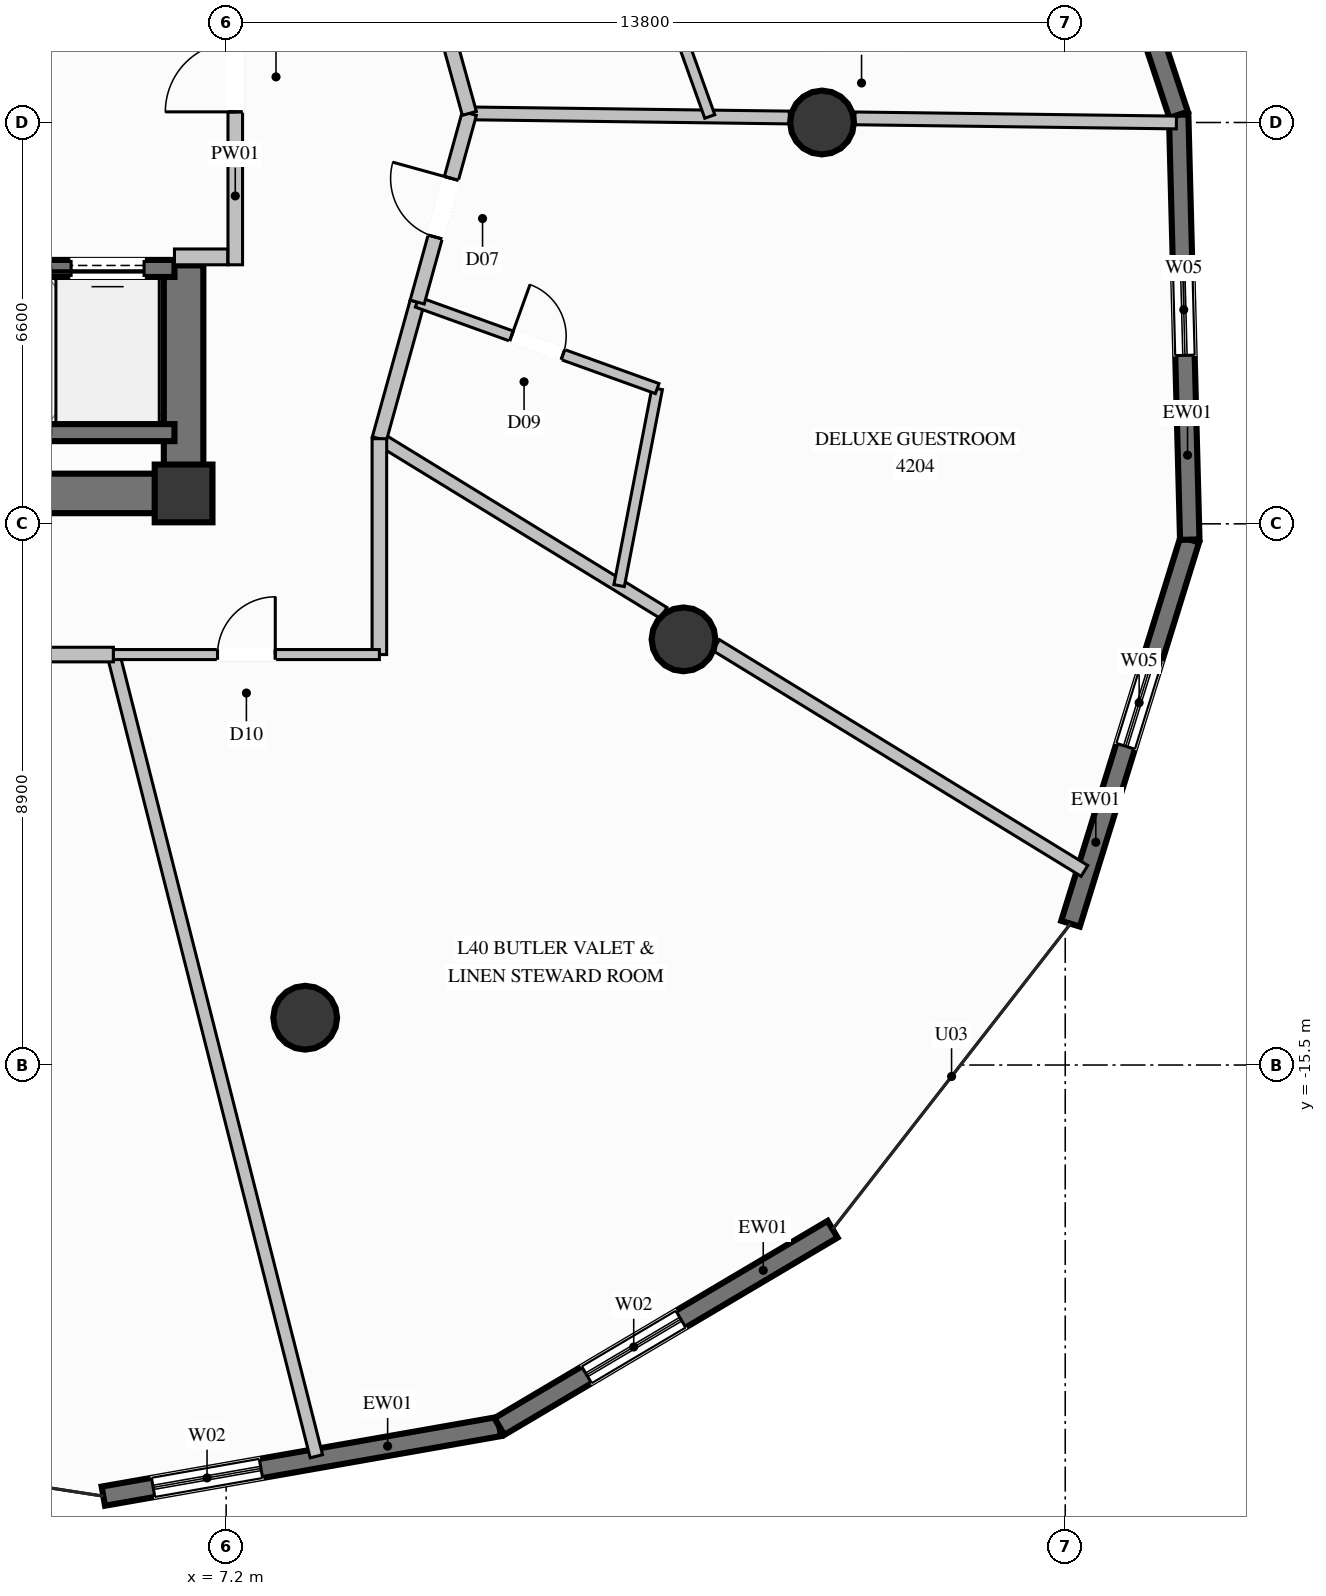
"""IFC4 building model, lengths in metres.
Left out: names, types, materials, properties, quantities, classifications, styles, units other than length and angle.
Written with IfcOpenShell. Run it as: python <this file> out.ifc"""

import sys

from ifc_helpers import new_model, si_unit, direction, frame, frame_2d, origin, origin_2d, place, context, subcontext, project, spatial, rectangle, circle, extrude, element, fill, save


model = new_model("IFC4")
c1 = context("Model", 3, precision=1e-05, world=origin(), true_north=direction((0.0, 1.0)))
c2 = subcontext(c1, "Body", "Model", "MODEL_VIEW")
j1 = project(units=[si_unit("LENGTHUNIT", "METRE"), si_unit("PLANEANGLEUNIT", "RADIAN")], contexts=[c1])
p1 = place(None, origin())
s1 = spatial("IfcSite", under=j1, at=p1, CompositionType="ELEMENT")
p2 = place(p1, origin())
s2 = spatial("IfcBuilding", under=s1, at=p2, CompositionType="ELEMENT")
p3 = place(p2, frame((0.0, 0.0, 156.6)))
s3 = spatial("IfcBuildingStorey", under=s2, at=p3, CompositionType="ELEMENT", Elevation=156.6)
p4 = place(p3, frame((6.5, -6.1, 0.0), z_axis=(0.0, 0.0, 1.0), x_axis=(1.0, 0.0, 0.0)))
e1 = element("IfcColumn", 1, at=p4, inside=s3, PredefinedType="COLUMN", context=c2, shape_type="SweptSolid", body=[
    extrude(rectangle(XDim=0.95, YDim=0.95, at=origin_2d()), origin(), (0.0, 0.0, 1.0), 3.6),
])
p5 = place(p3, frame((4.15, -6.1, 0.0), z_axis=(0.0, 0.0, 1.0), x_axis=(1.0, 0.0, 0.0)))
e2 = element("IfcWall", 2, at=p5, inside=s3, PredefinedType="SHEAR", context=c2, shape_type="SweptSolid", body=[
    extrude(rectangle(XDim=2.025, YDim=0.65, at=frame_2d((1.013, 0.0))), origin(), (0.0, 0.0, 1.0), 3.6),
])
p6 = place(p3, frame((6.5, -6.425, 0.0), z_axis=(0.0, 0.0, 1.0), x_axis=(0.0, 1.0, 0.0)))
e3 = element("IfcWall", 3, at=p6, inside=s3, PredefinedType="SHEAR", context=c2, shape_type="SweptSolid", body=[
    extrude(rectangle(XDim=4.075, YDim=0.65, at=frame_2d((2.038, 0.0))), origin(), (0.0, 0.0, 1.0), 3.6),
])
for number, where, z_axis, x_axis in (
    (4, (17.0, 0.0, 0.0), (0.0, 0.0, 1.0), (1.0, 0.0, 0.0)),
    (5, (8.5, -14.722, 0.0), (0.0, 0.0, 1.0), (1.0, 0.0, 0.0)),
    (6, (14.722, -8.5, 0.0), (0.0, 0.0, 1.0), (1.0, 0.0, 0.0)),
):
    element("IfcColumn", number, at=place(p3, frame(where, z_axis=z_axis, x_axis=x_axis)), inside=s3, PredefinedType="COLUMN", context=c2, shape_type="SweptSolid", body=[
        extrude(circle(Radius=0.525, at=origin_2d()), origin(), (0.0, 0.0, 1.0), 3.6),
    ])
p7 = place(p3, frame((23.048, -6.86, 0.0), z_axis=(0.0, 0.0, 1.0), x_axis=(-0.296546675367, -0.955018360729, 0.0)))
e7 = element("IfcWall", 7, at=p7, inside=s3, PredefinedType="SOLIDWALL", context=c2, shape_type="SweptSolid", body=[
    extrude(rectangle(XDim=6.613, YDim=0.32, at=frame_2d((3.307, 0.0))), origin(), (0.0, 0.0, 1.0), 3.35),
])
p8 = place(p7, frame((2.058, 0.0, 0.85)))
e8 = element("IfcOpeningElement", 8, at=p8, cuts=e7, PredefinedType="OPENING", context=c2, shape_type="SweptSolid", body=[
    extrude(rectangle(XDim=1.5, YDim=1.2, at=frame_2d((0.75, 0.6))), frame((0.0, 0.17, 0.0), z_axis=(0.0, -1.0, 0.0), x_axis=(1.0, 0.0, 0.0)), (0.0, 0.0, 1.0), 0.34),
])
p9 = place(p3, frame((22.865, 0.127, 0.0), z_axis=(0.0, 0.0, 1.0), x_axis=(0.026197372112, -0.999656789951, 0.0)))
e9 = element("IfcWall", 9, at=p9, inside=s3, PredefinedType="SOLIDWALL", context=c2, shape_type="SweptSolid", body=[
    extrude(rectangle(XDim=6.99, YDim=0.32, at=frame_2d((3.495, 0.0))), origin(), (0.0, 0.0, 1.0), 3.35),
])
p10 = place(p9, frame((2.458, 0.0, 0.85)))
e10 = element("IfcOpeningElement", 10, at=p10, cuts=e9, PredefinedType="OPENING", context=c2, shape_type="SweptSolid", body=[
    extrude(rectangle(XDim=1.5, YDim=1.2, at=frame_2d((0.75, 0.6))), frame((0.0, 0.17, 0.0), z_axis=(0.0, -1.0, 0.0), x_axis=(1.0, 0.0, 0.0)), (0.0, 0.0, 1.0), 0.34),
])
p11 = place(p3, frame((20.557, 7.102, 0.0), z_axis=(0.0, 0.0, 1.0), x_axis=(0.314153478082, -0.94937220952, 0.0)))
e11 = element("IfcWall", 11, at=p11, inside=s3, PredefinedType="SOLIDWALL", context=c2, shape_type="SweptSolid", body=[
    extrude(rectangle(XDim=7.347, YDim=0.32, at=frame_2d((3.674, 0.0))), origin(), (0.0, 0.0, 1.0), 3.35),
])
p12 = place(p11, frame((2.923, 0.0, 0.85)))
e12 = element("IfcOpeningElement", 12, at=p12, cuts=e11, PredefinedType="OPENING", context=c2, shape_type="SweptSolid", body=[
    extrude(rectangle(XDim=1.5, YDim=1.2, at=frame_2d((0.75, 0.6))), frame((0.0, 0.17, 0.0), z_axis=(0.0, -1.0, 0.0), x_axis=(1.0, 0.0, 0.0)), (0.0, 0.0, 1.0), 0.34),
])
p13 = place(p3, frame((11.693, -21.445, 0.0), z_axis=(0.0, 0.0, 1.0), x_axis=(-0.984896334406, -0.173145056165, 0.0)))
e13 = element("IfcWall", 13, at=p13, inside=s3, PredefinedType="SOLIDWALL", context=c2, shape_type="SweptSolid", body=[
    extrude(rectangle(XDim=6.613, YDim=0.32, at=frame_2d((3.307, 0.0))), origin(), (0.0, 0.0, 1.0), 3.35),
])
p14 = place(p13, frame((3.981, 0.0, 0.35)))
e14 = element("IfcOpeningElement", 14, at=p14, cuts=e13, PredefinedType="OPENING", context=c2, shape_type="SweptSolid", body=[
    extrude(rectangle(XDim=1.8, YDim=2.6, at=frame_2d((0.9, 1.3))), frame((0.0, 0.17, 0.0), z_axis=(0.0, -1.0, 0.0), x_axis=(1.0, 0.0, 0.0)), (0.0, 0.0, 1.0), 0.34),
])
p15 = place(p3, frame((17.174, -18.201, 0.0), z_axis=(0.0, 0.0, 1.0), x_axis=(-0.860555423253, -0.50935681355, 0.0)))
e15 = element("IfcWall", 15, at=p15, inside=s3, PredefinedType="SOLIDWALL", context=c2, shape_type="SweptSolid", body=[
    extrude(rectangle(XDim=6.369, YDim=0.32, at=frame_2d((3.185, 0.0))), origin(), (0.0, 0.0, 1.0), 3.35),
])
p16 = place(p15, frame((2.901, 0.0, 0.35)))
e16 = element("IfcOpeningElement", 16, at=p16, cuts=e15, PredefinedType="OPENING", context=c2, shape_type="SweptSolid", body=[
    extrude(rectangle(XDim=1.8, YDim=2.6, at=frame_2d((0.9, 1.3))), frame((0.0, 0.17, 0.0), z_axis=(0.0, -1.0, 0.0), x_axis=(1.0, 0.0, 0.0)), (0.0, 0.0, 1.0), 0.34),
])
p17 = place(p3, frame((4.15, -5.1, 0.0), z_axis=(0.0, 0.0, 1.0), x_axis=(1.0, 0.0, 0.0)))
e17 = element("IfcWall", 17, at=p17, inside=s3, PredefinedType="SOLIDWALL", context=c2, shape_type="SweptSolid", body=[
    extrude(rectangle(XDim=2.2, YDim=0.28, at=frame_2d((1.1, 0.0))), origin(), (0.0, 0.0, 1.0), 3.35),
])
p18 = place(p3, frame((6.35, -2.4, 0.0), z_axis=(0.0, 0.0, 1.0), x_axis=(-1.0, 0.0, 0.0)))
e18 = element("IfcWall", 18, at=p18, inside=s3, PredefinedType="SOLIDWALL", context=c2, shape_type="SweptSolid", body=[
    extrude(rectangle(XDim=2.2, YDim=0.28, at=frame_2d((1.1, 0.0))), origin(), (0.0, 0.0, 1.0), 3.35),
])
p19 = place(p18, frame((0.5, 0.0, 0.0)))
e19 = element("IfcOpeningElement", 19, at=p19, cuts=e18, PredefinedType="OPENING", context=c2, shape_type="SweptSolid", body=[
    extrude(rectangle(XDim=1.2, YDim=2.2, at=frame_2d((0.6, 1.1))), frame((0.0, 0.15, 0.0), z_axis=(0.0, -1.0, 0.0), x_axis=(1.0, 0.0, 0.0)), (0.0, 0.0, 1.0), 0.3),
])
p20 = place(p3, frame((7.35, -2.34, 0.0), z_axis=(0.0, 0.0, 1.0), x_axis=(0.0, 1.0, 0.0)))
e20 = element("IfcWall", 20, at=p20, inside=s3, PredefinedType="PARTITIONING", context=c2, shape_type="SweptSolid", body=[
    extrude(rectangle(XDim=5.02, YDim=0.24, at=frame_2d((2.51, 0.0))), origin(), (0.0, 0.0, 1.0), 2.435),
])
p21 = place(p20, frame((2.515, 0.0, 0.0)))
e21 = element("IfcOpeningElement", 21, at=p21, cuts=e20, PredefinedType="OPENING", context=c2, shape_type="SweptSolid", body=[
    extrude(rectangle(XDim=1.15, YDim=2.2, at=frame_2d((0.575, 1.1))), frame((0.0, 0.13, 0.0), z_axis=(0.0, -1.0, 0.0), x_axis=(1.0, 0.0, 0.0)), (0.0, 0.0, 1.0), 0.26),
])
p22 = place(p3, frame((6.35, -2.21, 0.0), z_axis=(0.0, 0.0, 1.0), x_axis=(1.0, 0.0, 0.0)))
e22 = element("IfcWall", 22, at=p22, inside=s3, PredefinedType="PARTITIONING", context=c2, shape_type="SweptSolid", body=[
    extrude(rectangle(XDim=0.875, YDim=0.26, at=frame_2d((0.438, 0.0))), origin(), (0.0, 0.0, 1.0), 3.35),
])
p23 = place(p3, frame((11.2, 0.15, 0.0), z_axis=(0.0, 0.0, 1.0), x_axis=(0.99991679467, -0.012899757247, 0.0)))
e23 = element("IfcWall", 23, at=p23, inside=s3, PredefinedType="PARTITIONING", context=c2, shape_type="SweptSolid", body=[
    extrude(rectangle(XDim=5.261, YDim=0.21, at=frame_2d((2.631, 0.0))), origin(), (0.0, 0.0, 1.0), 3.35),
])
p24 = place(p3, frame((17.541, 0.068, 0.0), z_axis=(0.0, 0.0, 1.0), x_axis=(0.9999170134, -0.012882791353, 0.0)))
e24 = element("IfcWall", 24, at=p24, inside=s3, PredefinedType="PARTITIONING", context=c2, shape_type="SweptSolid", body=[
    extrude(rectangle(XDim=5.287, YDim=0.21, at=frame_2d((2.644, 0.0))), origin(), (0.0, 0.0, 1.0), 3.35),
])
p25 = place(p3, frame((9.72, -5.2, 0.0), z_axis=(0.0, 0.0, 1.0), x_axis=(0.852582050819, -0.52259338555, 0.0)))
e25 = element("IfcWall", 25, at=p25, inside=s3, PredefinedType="PARTITIONING", context=c2, shape_type="SweptSolid", body=[
    extrude(rectangle(XDim=5.482, YDim=0.21, at=frame_2d((2.741, 0.0))), origin(), (0.0, 0.0, 1.0), 2.717),
])
p26 = place(p3, frame((15.259, -8.595, 0.0), z_axis=(0.0, 0.0, 1.0), x_axis=(0.852624466561, -0.522524180322, 0.0)))
e26 = element("IfcWall", 26, at=p26, inside=s3, PredefinedType="PARTITIONING", context=c2, shape_type="SweptSolid", body=[
    extrude(rectangle(XDim=7.104, YDim=0.21, at=frame_2d((3.552, 0.0))), origin(), (0.0, 0.0, 1.0), 3.35),
])
p27 = place(p3, frame((9.72, -5.2, 0.0), z_axis=(0.0, 0.0, 1.0), x_axis=(0.266801280383, 0.963751563831, 0.0)))
e27 = element("IfcWall", 27, at=p27, inside=s3, PredefinedType="PARTITIONING", context=c2, shape_type="SweptSolid", body=[
    extrude(rectangle(XDim=2.332, YDim=0.24, at=frame_2d((1.166, 0.0))), origin(), (0.0, 0.0, 1.0), 3.35),
])
p28 = place(p3, frame((13.663, -7.616, 0.0), z_axis=(0.0, 0.0, 1.0), x_axis=(0.189695238056, 0.981843020375, 0.0)))
e28 = element("IfcWall", 28, at=p28, inside=s3, PredefinedType="PLUMBINGWALL", context=c2, shape_type="SweptSolid", body=[
    extrude(rectangle(XDim=3.3, YDim=0.175, at=frame_2d((1.65, 0.0))), origin(), (0.0, 0.0, 1.0), 3.35),
])
p29 = place(p3, frame((10.342, -2.953, 0.0), z_axis=(0.0, 0.0, 1.0), x_axis=(0.940722627473, -0.33917685381, 0.0)))
e29 = element("IfcWall", 29, at=p29, inside=s3, PredefinedType="PLUMBINGWALL", context=c2, shape_type="SweptSolid", body=[
    extrude(rectangle(XDim=4.196, YDim=0.175, at=frame_2d((2.098, 0.0))), origin(), (0.0, 0.0, 1.0), 3.35),
])
p30 = place(p29, frame((1.648, 0.0, 0.0)))
e30 = element("IfcOpeningElement", 30, at=p30, cuts=e29, PredefinedType="OPENING", context=c2, shape_type="SweptSolid", body=[
    extrude(rectangle(XDim=0.9, YDim=2.1, at=frame_2d((0.45, 1.05))), frame((0.0, 0.098, 0.0), z_axis=(0.0, -1.0, 0.0), x_axis=(1.0, 0.0, 0.0)), (0.0, 0.0, 1.0), 0.195),
])
p31 = place(p3, frame((10.342, -2.953, 0.0), z_axis=(0.0, 0.0, 1.0), x_axis=(0.266497617314, 0.963835577246, 0.0)))
e31 = element("IfcWall", 31, at=p31, inside=s3, PredefinedType="PARTITIONING", context=c2, shape_type="SweptSolid", body=[
    extrude(rectangle(XDim=3.219, YDim=0.24, at=frame_2d((1.61, 0.0))), origin(), (0.0, 0.0, 1.0), 3.35),
])
p32 = place(p31, frame((1.11, 0.0, 0.0)))
e32 = element("IfcOpeningElement", 32, at=p32, cuts=e31, PredefinedType="OPENING", context=c2, shape_type="SweptSolid", body=[
    extrude(rectangle(XDim=1.0, YDim=2.2, at=frame_2d((0.5, 1.1))), frame((0.0, 0.13, 0.0), z_axis=(0.0, -1.0, 0.0), x_axis=(1.0, 0.0, 0.0)), (0.0, 0.0, 1.0), 0.26),
])
p33 = place(p3, frame((11.2, 0.15, 0.0), z_axis=(0.0, 0.0, 1.0), x_axis=(-0.266801280383, 0.963751563831, 0.0)))
e33 = element("IfcWall", 33, at=p33, inside=s3, PredefinedType="PARTITIONING", context=c2, shape_type="SweptSolid", body=[
    extrude(rectangle(XDim=2.332, YDim=0.24, at=frame_2d((1.166, 0.0))), origin(), (0.0, 0.0, 1.0), 3.35),
])
p34 = place(p3, frame((15.154, 0.099, 0.0), z_axis=(0.0, 0.0, 1.0), x_axis=(-0.337194784979, 0.94143490321, 0.0)))
e34 = element("IfcWall", 34, at=p34, inside=s3, PredefinedType="PLUMBINGWALL", context=c2, shape_type="SweptSolid", body=[
    extrude(rectangle(XDim=3.171, YDim=0.175, at=frame_2d((1.585, 0.0))), origin(), (0.0, 0.0, 1.0), 3.35),
])
p35 = place(p3, frame((5.346, -8.75, 0.0), z_axis=(0.0, 0.0, 1.0), x_axis=(0.245448987191, -0.969409508251, 0.0)))
e35 = element("IfcWall", 35, at=p35, inside=s3, PredefinedType="PARTITIONING", context=c2, shape_type="SweptSolid", body=[
    extrude(rectangle(XDim=13.6, YDim=0.21, at=frame_2d((6.8, 0.0))), origin(), (0.0, 0.0, 1.0), 3.35),
])
p36 = place(p3, frame((0.0, -8.75, 0.0), z_axis=(0.0, 0.0, 1.0), x_axis=(1.0, 0.0, 0.0)))
e36 = element("IfcWall", 36, at=p36, inside=s3, PredefinedType="PARTITIONING", context=c2, shape_type="SweptSolid", body=[
    extrude(rectangle(XDim=5.346, YDim=0.24, at=frame_2d((2.673, 0.0))), origin(), (0.0, 0.0, 1.0), 3.35),
])
p37 = place(p36, frame((2.173, 0.0, 0.0)))
e37 = element("IfcOpeningElement", 37, at=p37, cuts=e36, PredefinedType="OPENING", context=c2, shape_type="SweptSolid", body=[
    extrude(rectangle(XDim=1.0, YDim=2.2, at=frame_2d((0.5, 1.1))), frame((0.0, 0.13, 0.0), z_axis=(0.0, -1.0, 0.0), x_axis=(1.0, 0.0, 0.0)), (0.0, 0.0, 1.0), 0.26),
])
p38 = place(p3, frame((9.72, -8.75, 0.0), z_axis=(0.0, 0.0, 1.0), x_axis=(0.0, 1.0, 0.0)))
e38 = element("IfcWall", 38, at=p38, inside=s3, PredefinedType="PARTITIONING", context=c2, shape_type="SweptSolid", body=[
    extrude(rectangle(XDim=3.55, YDim=0.24, at=frame_2d((1.775, 0.0))), origin(), (0.0, 0.0, 1.0), 3.35),
])
p39 = place(p3, frame((5.346, -8.75, 0.0), z_axis=(0.0, 0.0, 1.0), x_axis=(1.0, 0.0, 0.0)))
e39 = element("IfcWall", 39, at=p39, inside=s3, PredefinedType="PARTITIONING", context=c2, shape_type="SweptSolid", body=[
    extrude(rectangle(XDim=4.374, YDim=0.165, at=frame_2d((2.187, 0.0))), origin(), (0.0, 0.0, 1.0), 3.35),
])
p40 = place(p39, frame((1.712, 0.0, 0.0)))
e40 = element("IfcOpeningElement", 40, at=p40, cuts=e39, PredefinedType="OPENING", context=c2, shape_type="SweptSolid", body=[
    extrude(rectangle(XDim=0.95, YDim=2.1, at=frame_2d((0.475, 1.05))), frame((0.0, 0.093, 0.0), z_axis=(0.0, -1.0, 0.0), x_axis=(1.0, 0.0, 0.0)), (0.0, 0.0, 1.0), 0.185),
])
p41 = place(p8, origin())
e41 = element("IfcWindow", 41, at=p41, inside=s3, PartitioningType="SINGLE_PANEL", PredefinedType="WINDOW", context=c2, shape_type="SweptSolid", body=[
    extrude(rectangle(XDim=1.5, YDim=1.2, at=frame_2d((0.75, 0.6))), frame((0.0, 0.03, 0.0), z_axis=(0.0, -1.0, 0.0), x_axis=(1.0, 0.0, 0.0)), (0.0, 0.0, 1.0), 0.06),
])
fill(e8, e41)
p42 = place(p10, origin())
e42 = element("IfcWindow", 42, at=p42, inside=s3, PartitioningType="SINGLE_PANEL", PredefinedType="WINDOW", context=c2, shape_type="SweptSolid", body=[
    extrude(rectangle(XDim=1.5, YDim=1.2, at=frame_2d((0.75, 0.6))), frame((0.0, 0.03, 0.0), z_axis=(0.0, -1.0, 0.0), x_axis=(1.0, 0.0, 0.0)), (0.0, 0.0, 1.0), 0.06),
])
fill(e10, e42)
p43 = place(p14, origin())
e43 = element("IfcWindow", 43, at=p43, inside=s3, PartitioningType="SINGLE_PANEL", PredefinedType="WINDOW", context=c2, shape_type="SweptSolid", body=[
    extrude(rectangle(XDim=1.8, YDim=2.6, at=frame_2d((0.9, 1.3))), frame((0.0, 0.03, 0.0), z_axis=(0.0, -1.0, 0.0), x_axis=(1.0, 0.0, 0.0)), (0.0, 0.0, 1.0), 0.06),
])
fill(e14, e43)
p44 = place(p16, origin())
e44 = element("IfcWindow", 44, at=p44, inside=s3, PartitioningType="SINGLE_PANEL", PredefinedType="WINDOW", context=c2, shape_type="SweptSolid", body=[
    extrude(rectangle(XDim=1.8, YDim=2.6, at=frame_2d((0.9, 1.3))), frame((0.0, 0.03, 0.0), z_axis=(0.0, -1.0, 0.0), x_axis=(1.0, 0.0, 0.0)), (0.0, 0.0, 1.0), 0.06),
])
fill(e16, e44)
p45 = place(p19, origin())
e45 = element("IfcDoor", 45, at=p45, inside=s3, OperationType="SLIDING_TO_LEFT", PredefinedType="DOOR", context=c2, shape_type="SweptSolid", body=[
    extrude(rectangle(XDim=1.2, YDim=2.2, at=frame_2d((0.6, 1.1))), frame((0.0, 0.025, 0.0), z_axis=(0.0, -1.0, 0.0), x_axis=(1.0, 0.0, 0.0)), (0.0, 0.0, 1.0), 0.05),
])
fill(e19, e45)
p46 = place(p21, origin())
e46 = element("IfcDoor", 46, at=p46, inside=s3, OperationType="SINGLE_SWING_LEFT", PredefinedType="DOOR", context=c2, shape_type="SweptSolid", body=[
    extrude(rectangle(XDim=1.15, YDim=2.2, at=frame_2d((0.575, 1.1))), frame((0.0, 0.025, 0.0), z_axis=(0.0, -1.0, 0.0), x_axis=(1.0, 0.0, 0.0)), (0.0, 0.0, 1.0), 0.05),
])
fill(e21, e46)
p47 = place(p30, origin())
e47 = element("IfcDoor", 47, at=p47, inside=s3, OperationType="SINGLE_SWING_LEFT", PredefinedType="DOOR", context=c2, shape_type="SweptSolid", body=[
    extrude(rectangle(XDim=0.9, YDim=2.1, at=frame_2d((0.45, 1.05))), frame((0.0, 0.025, 0.0), z_axis=(0.0, -1.0, 0.0), x_axis=(1.0, 0.0, 0.0)), (0.0, 0.0, 1.0), 0.05),
])
fill(e30, e47)
p48 = place(p32, origin())
e48 = element("IfcDoor", 48, at=p48, inside=s3, OperationType="SINGLE_SWING_RIGHT", PredefinedType="DOOR", context=c2, shape_type="SweptSolid", body=[
    extrude(rectangle(XDim=1.0, YDim=2.2, at=frame_2d((0.5, 1.1))), frame((0.0, 0.025, 0.0), z_axis=(0.0, -1.0, 0.0), x_axis=(1.0, 0.0, 0.0)), (0.0, 0.0, 1.0), 0.05),
])
fill(e32, e48)
p49 = place(p40, origin())
e49 = element("IfcDoor", 49, at=p49, inside=s3, OperationType="SINGLE_SWING_RIGHT", PredefinedType="DOOR", context=c2, shape_type="SweptSolid", body=[
    extrude(rectangle(XDim=0.95, YDim=2.1, at=frame_2d((0.475, 1.05))), frame((0.0, 0.025, 0.0), z_axis=(0.0, -1.0, 0.0), x_axis=(1.0, 0.0, 0.0)), (0.0, 0.0, 1.0), 0.05),
])
fill(e40, e49)
save(model, sys.argv[1])
